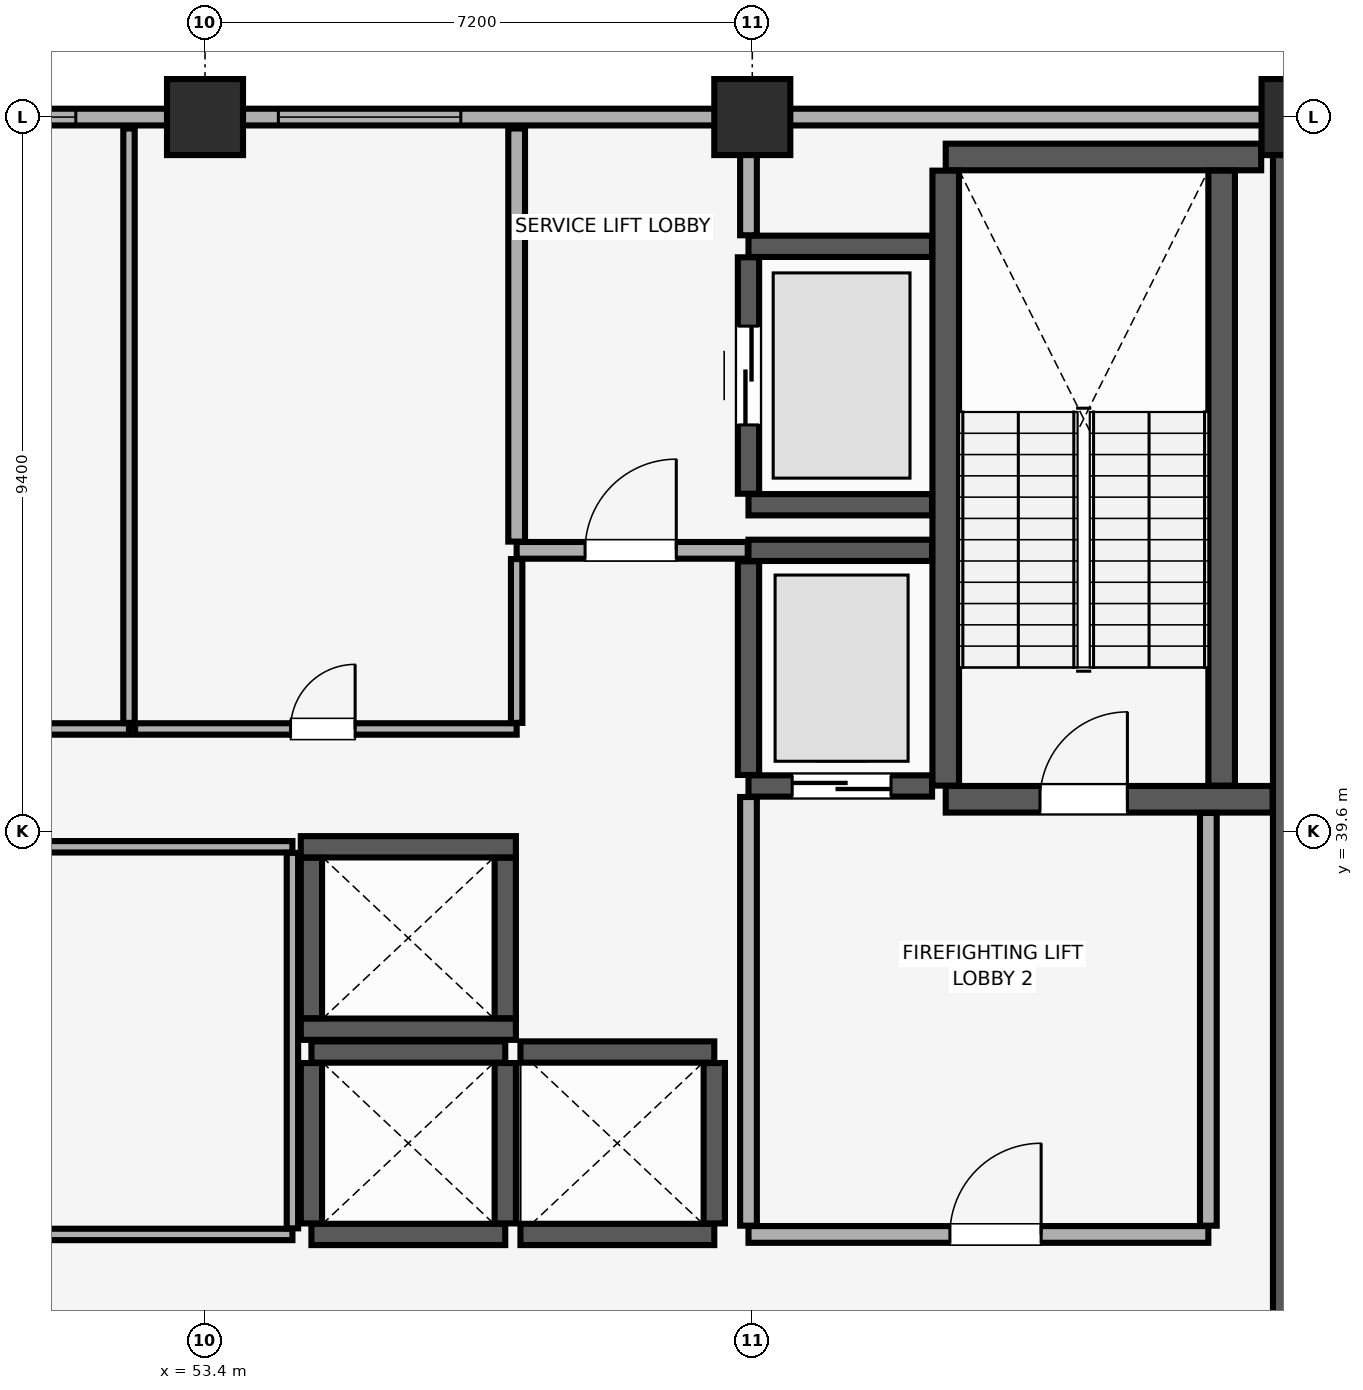
"""IFC4 building model, lengths in metres.
Left out: names, types, materials, properties, quantities, classifications, styles, units other than length and angle.
Written with IfcOpenShell. Run it as: python <this file> out.ifc"""

import sys

from ifc_helpers import new_model, si_unit, direction, frame, frame_2d, origin, origin_2d, place, context, subcontext, project, spatial, rectangle, extrude, element, fill, save


model = new_model("IFC4")
c1 = context("Model", 3, precision=1e-05, world=origin(), true_north=direction((0.0, 1.0)))
c2 = subcontext(c1, "Body", "Model", "MODEL_VIEW")
j1 = project(units=[si_unit("LENGTHUNIT", "METRE"), si_unit("PLANEANGLEUNIT", "RADIAN")], contexts=[c1])
p1 = place(None, origin())
s1 = spatial("IfcSite", under=j1, at=p1, CompositionType="ELEMENT")
p2 = place(p1, origin())
s2 = spatial("IfcBuilding", under=s1, at=p2, CompositionType="ELEMENT")
p3 = place(p2, frame((0.0, 0.0, 285.9)))
s3 = spatial("IfcBuildingStorey", under=s2, at=p3, CompositionType="ELEMENT", Elevation=285.9)
for number, where, z_axis, x_axis in (
    (1, (53.4, 49.0, 0.0), (0.0, 0.0, 1.0), (1.0, 0.0, 0.0)),
    (2, (60.6, 49.0, 0.0), (0.0, 0.0, 1.0), (1.0, 0.0, 0.0)),
    (3, (67.8, 49.0, 0.0), (0.0, 0.0, 1.0), (1.0, 0.0, 0.0)),
):
    element("IfcColumn", number, at=place(p3, frame(where, z_axis=z_axis, x_axis=x_axis)), inside=s3, PredefinedType="COLUMN", context=c2, shape_type="SweptSolid", body=[
        extrude(rectangle(XDim=1.0, YDim=1.0, at=origin_2d()), origin(), (0.0, 0.0, 1.0), 4.1),
    ])
p4 = place(p3, frame((71.4, 49.0, 0.0), z_axis=(0.0, 0.0, 1.0), x_axis=(-1.0, 0.0, 0.0)))
e4 = element("IfcWall", 4, at=p4, inside=s3, PredefinedType="SOLIDWALL", context=c2, shape_type="SweptSolid", body=[
    extrude(rectangle(XDim=58.8, YDim=0.22, at=frame_2d((29.4, 0.0))), origin(), (0.0, 0.0, 1.0), 3.3),
])
p5 = place(p4, frame((56.365, 0.0, 0.85)))
e5 = element("IfcOpeningElement", 5, at=p5, cuts=e4, PredefinedType="OPENING", context=c2, shape_type="SweptSolid", body=[
    extrude(rectangle(XDim=1.5, YDim=1.4, at=frame_2d((0.75, 0.7))), frame((0.0, 0.12, 0.0), z_axis=(0.0, -1.0, 0.0), x_axis=(1.0, 0.0, 0.0)), (0.0, 0.0, 1.0), 0.24),
])
p6 = place(p4, frame((0.935, 0.0, 0.85)))
e6 = element("IfcOpeningElement", 6, at=p6, cuts=e4, PredefinedType="OPENING", context=c2, shape_type="SweptSolid", body=[
    extrude(rectangle(XDim=1.5, YDim=1.4, at=frame_2d((0.75, 0.7))), frame((0.0, 0.12, 0.0), z_axis=(0.0, -1.0, 0.0), x_axis=(1.0, 0.0, 0.0)), (0.0, 0.0, 1.0), 0.24),
])
p7 = place(p4, frame((41.915, 0.0, 0.9)))
e7 = element("IfcOpeningElement", 7, at=p7, cuts=e4, PredefinedType="OPENING", context=c2, shape_type="SweptSolid", body=[
    extrude(rectangle(XDim=3.6, YDim=1.5, at=frame_2d((1.8, 0.75))), frame((0.0, 0.12, 0.0), z_axis=(0.0, -1.0, 0.0), x_axis=(1.0, 0.0, 0.0)), (0.0, 0.0, 1.0), 0.24),
])
p8 = place(p4, frame((36.85, 0.0, 0.9)))
e8 = element("IfcOpeningElement", 8, at=p8, cuts=e4, PredefinedType="OPENING", context=c2, shape_type="SweptSolid", body=[
    extrude(rectangle(XDim=3.0, YDim=1.5, at=frame_2d((1.5, 0.75))), frame((0.0, 0.12, 0.0), z_axis=(0.0, -1.0, 0.0), x_axis=(1.0, 0.0, 0.0)), (0.0, 0.0, 1.0), 0.24),
])
p9 = place(p4, frame((19.7, 0.0, 0.9)))
e9 = element("IfcOpeningElement", 9, at=p9, cuts=e4, PredefinedType="OPENING", context=c2, shape_type="SweptSolid", body=[
    extrude(rectangle(XDim=3.6, YDim=1.5, at=frame_2d((1.8, 0.75))), frame((0.0, 0.12, 0.0), z_axis=(0.0, -1.0, 0.0), x_axis=(1.0, 0.0, 0.0)), (0.0, 0.0, 1.0), 0.24),
])
p10 = place(p4, frame((14.635, 0.0, 0.9)))
e10 = element("IfcOpeningElement", 10, at=p10, cuts=e4, PredefinedType="OPENING", context=c2, shape_type="SweptSolid", body=[
    extrude(rectangle(XDim=2.4, YDim=1.5, at=frame_2d((1.2, 0.75))), frame((0.0, 0.12, 0.0), z_axis=(0.0, -1.0, 0.0), x_axis=(1.0, 0.0, 0.0)), (0.0, 0.0, 1.0), 0.24),
])
p11 = place(p3, frame((67.8, 29.4, 0.0), z_axis=(0.0, 0.0, 1.0), x_axis=(0.0, 1.0, 0.0)))
e11 = element("IfcWall", 11, at=p11, inside=s3, PredefinedType="SHEAR", context=c2, shape_type="SweptSolid", body=[
    extrude(rectangle(XDim=19.2, YDim=0.7, at=frame_2d((9.6, 0.0))), origin(), (0.0, 0.0, 1.0), 4.1),
])
p12 = place(p3, frame((63.145, 40.025, 0.0), z_axis=(0.0, 0.0, 1.0), x_axis=(1.0, 0.0, 0.0)))
e12 = element("IfcWall", 12, at=p12, inside=s3, PredefinedType="SHEAR", context=c2, shape_type="SweptSolid", body=[
    extrude(rectangle(XDim=4.3, YDim=0.35, at=frame_2d((2.15, 0.0))), origin(), (0.0, 0.0, 1.0), 4.1),
])
p13 = place(p12, frame((1.24, 0.0, 0.0)))
e13 = element("IfcOpeningElement", 13, at=p13, cuts=e12, PredefinedType="OPENING", context=c2, shape_type="SweptSolid", body=[
    extrude(rectangle(XDim=1.15, YDim=2.15, at=frame_2d((0.575, 1.075))), frame((0.0, 0.185, 0.0), z_axis=(0.0, -1.0, 0.0), x_axis=(1.0, 0.0, 0.0)), (0.0, 0.0, 1.0), 0.37),
])
p14 = place(p3, frame((63.145, 48.475, 0.0), z_axis=(0.0, 0.0, 1.0), x_axis=(1.0, 0.0, 0.0)))
e14 = element("IfcWall", 14, at=p14, inside=s3, PredefinedType="SHEAR", context=c2, shape_type="SweptSolid", body=[
    extrude(rectangle(XDim=4.15, YDim=0.35, at=frame_2d((2.075, 0.0))), origin(), (0.0, 0.0, 1.0), 4.1),
])
for number, where, z_axis, x_axis in (
    (15, (63.145, 40.205, 0.0), (0.0, 0.0, 1.0), (0.0, 1.0, 0.0)),
    (16, (66.775, 40.205, 0.0), (0.0, 0.0, 1.0), (0.0, 1.0, 0.0)),
):
    element("IfcWall", number, at=place(p3, frame(where, z_axis=z_axis, x_axis=x_axis)), inside=s3, PredefinedType="SHEAR", context=c2, shape_type="SweptSolid", body=[
        extrude(rectangle(XDim=8.09, YDim=0.35, at=frame_2d((4.045, 0.0))), origin(), (0.0, 0.0, 1.0), 4.1),
    ])
for number, where, z_axis, x_axis in (
    (17, (54.8, 34.3, 0.0), (0.0, 0.0, 1.0), (1.0, 0.0, 0.0)),
    (18, (54.8, 36.7, 0.0), (0.0, 0.0, 1.0), (1.0, 0.0, 0.0)),
):
    element("IfcWall", number, at=place(p3, frame(where, z_axis=z_axis, x_axis=x_axis)), inside=s3, PredefinedType="SHEAR", context=c2, shape_type="SweptSolid", body=[
        extrude(rectangle(XDim=2.55, YDim=0.28, at=frame_2d((1.275, 0.0))), origin(), (0.0, 0.0, 1.0), 4.1),
    ])
for number, where, z_axis, x_axis in (
    (19, (54.8, 34.445, 0.0), (0.0, 0.0, 1.0), (0.0, 1.0, 0.0)),
    (20, (57.35, 34.445, 0.0), (0.0, 0.0, 1.0), (0.0, 1.0, 0.0)),
):
    element("IfcWall", number, at=place(p3, frame(where, z_axis=z_axis, x_axis=x_axis)), inside=s3, PredefinedType="SHEAR", context=c2, shape_type="SweptSolid", body=[
        extrude(rectangle(XDim=2.11, YDim=0.28, at=frame_2d((1.055, 0.0))), origin(), (0.0, 0.0, 1.0), 4.1),
    ])
for number, where, z_axis, x_axis in (
    (21, (57.55, 34.3, 0.0), (0.0, 0.0, 1.0), (1.0, 0.0, 0.0)),
    (22, (57.55, 36.7, 0.0), (0.0, 0.0, 1.0), (1.0, 0.0, 0.0)),
):
    element("IfcWall", number, at=place(p3, frame(where, z_axis=z_axis, x_axis=x_axis)), inside=s3, PredefinedType="SHEAR", context=c2, shape_type="SweptSolid", body=[
        extrude(rectangle(XDim=2.55, YDim=0.28, at=frame_2d((1.275, 0.0))), origin(), (0.0, 0.0, 1.0), 4.1),
    ])
p15 = place(p3, frame((60.1, 34.445, 0.0), z_axis=(0.0, 0.0, 1.0), x_axis=(0.0, 1.0, 0.0)))
e23 = element("IfcWall", 23, at=p15, inside=s3, PredefinedType="SHEAR", context=c2, shape_type="SweptSolid", body=[
    extrude(rectangle(XDim=2.11, YDim=0.28, at=frame_2d((1.055, 0.0))), origin(), (0.0, 0.0, 1.0), 4.1),
])
for number, where, z_axis, x_axis in (
    (24, (54.66, 37.0, 0.0), (0.0, 0.0, 1.0), (1.0, 0.0, 0.0)),
    (25, (54.66, 39.4, 0.0), (0.0, 0.0, 1.0), (1.0, 0.0, 0.0)),
):
    element("IfcWall", number, at=place(p3, frame(where, z_axis=z_axis, x_axis=x_axis)), inside=s3, PredefinedType="SHEAR", context=c2, shape_type="SweptSolid", body=[
        extrude(rectangle(XDim=2.83, YDim=0.28, at=frame_2d((1.415, 0.0))), origin(), (0.0, 0.0, 1.0), 4.1),
    ])
for number, where, z_axis, x_axis in (
    (26, (54.8, 37.145, 0.0), (0.0, 0.0, 1.0), (0.0, 1.0, 0.0)),
    (27, (57.35, 37.145, 0.0), (0.0, 0.0, 1.0), (0.0, 1.0, 0.0)),
):
    element("IfcWall", number, at=place(p3, frame(where, z_axis=z_axis, x_axis=x_axis)), inside=s3, PredefinedType="SHEAR", context=c2, shape_type="SweptSolid", body=[
        extrude(rectangle(XDim=2.11, YDim=0.28, at=frame_2d((1.055, 0.0))), origin(), (0.0, 0.0, 1.0), 4.1),
    ])
p16 = place(p3, frame((60.55, 40.2, 0.0), z_axis=(0.0, 0.0, 1.0), x_axis=(1.0, 0.0, 0.0)))
e28 = element("IfcWall", 28, at=p16, inside=s3, PredefinedType="SHEAR", context=c2, shape_type="SweptSolid", body=[
    extrude(rectangle(XDim=2.415, YDim=0.28, at=frame_2d((1.208, 0.0))), origin(), (0.0, 0.0, 1.0), 4.1),
])
p17 = place(p16, frame((0.575, 0.0, 0.0)))
e29 = element("IfcOpeningElement", 29, at=p17, cuts=e28, PredefinedType="OPENING", context=c2, shape_type="SweptSolid", body=[
    extrude(rectangle(XDim=1.3, YDim=2.3, at=frame_2d((0.65, 1.15))), frame((0.0, 0.15, 0.0), z_axis=(0.0, -1.0, 0.0), x_axis=(1.0, 0.0, 0.0)), (0.0, 0.0, 1.0), 0.3),
])
p18 = place(p3, frame((60.55, 43.3, 0.0), z_axis=(0.0, 0.0, 1.0), x_axis=(1.0, 0.0, 0.0)))
e30 = element("IfcWall", 30, at=p18, inside=s3, PredefinedType="SHEAR", context=c2, shape_type="SweptSolid", body=[
    extrude(rectangle(XDim=2.415, YDim=0.28, at=frame_2d((1.208, 0.0))), origin(), (0.0, 0.0, 1.0), 4.1),
])
p19 = place(p3, frame((60.55, 40.345, 0.0), z_axis=(0.0, 0.0, 1.0), x_axis=(0.0, 1.0, 0.0)))
e31 = element("IfcWall", 31, at=p19, inside=s3, PredefinedType="SHEAR", context=c2, shape_type="SweptSolid", body=[
    extrude(rectangle(XDim=2.81, YDim=0.28, at=frame_2d((1.405, 0.0))), origin(), (0.0, 0.0, 1.0), 4.1),
])
for number, where, z_axis, x_axis in (
    (32, (60.55, 43.9, 0.0), (0.0, 0.0, 1.0), (1.0, 0.0, 0.0)),
    (33, (60.55, 47.3, 0.0), (0.0, 0.0, 1.0), (1.0, 0.0, 0.0)),
):
    element("IfcWall", number, at=place(p3, frame(where, z_axis=z_axis, x_axis=x_axis)), inside=s3, PredefinedType="SHEAR", context=c2, shape_type="SweptSolid", body=[
        extrude(rectangle(XDim=2.415, YDim=0.28, at=frame_2d((1.208, 0.0))), origin(), (0.0, 0.0, 1.0), 4.1),
    ])
p20 = place(p3, frame((60.55, 44.045, 0.0), z_axis=(0.0, 0.0, 1.0), x_axis=(0.0, 1.0, 0.0)))
e34 = element("IfcWall", 34, at=p20, inside=s3, PredefinedType="SHEAR", context=c2, shape_type="SweptSolid", body=[
    extrude(rectangle(XDim=3.11, YDim=0.28, at=frame_2d((1.555, 0.0))), origin(), (0.0, 0.0, 1.0), 4.1),
])
p21 = place(p20, frame((0.905, 0.0, 0.0)))
e35 = element("IfcOpeningElement", 35, at=p21, cuts=e34, PredefinedType="OPENING", context=c2, shape_type="SweptSolid", body=[
    extrude(rectangle(XDim=1.3, YDim=2.3, at=frame_2d((0.65, 1.15))), frame((0.0, 0.15, 0.0), z_axis=(0.0, -1.0, 0.0), x_axis=(1.0, 0.0, 0.0)), (0.0, 0.0, 1.0), 0.3),
])
p22 = place(p3, frame((60.55, 34.3, 0.0), z_axis=(0.0, 0.0, 1.0), x_axis=(1.0, 0.0, 0.0)))
e36 = element("IfcWall", 36, at=p22, inside=s3, PredefinedType="PARTITIONING", context=c2, shape_type="SweptSolid", body=[
    extrude(rectangle(XDim=6.05, YDim=0.22, at=frame_2d((3.025, 0.0))), origin(), (0.0, 0.0, 1.0), 4.1),
])
p23 = place(p22, frame((2.65, 0.0, 0.0)))
e37 = element("IfcOpeningElement", 37, at=p23, cuts=e36, PredefinedType="OPENING", context=c2, shape_type="SweptSolid", body=[
    extrude(rectangle(XDim=1.2, YDim=2.15, at=frame_2d((0.6, 1.075))), frame((0.0, 0.12, 0.0), z_axis=(0.0, -1.0, 0.0), x_axis=(1.0, 0.0, 0.0)), (0.0, 0.0, 1.0), 0.24),
])
p24 = place(p3, frame((60.55, 34.415, 0.0), z_axis=(0.0, 0.0, 1.0), x_axis=(0.0, 1.0, 0.0)))
e38 = element("IfcWall", 38, at=p24, inside=s3, PredefinedType="PARTITIONING", context=c2, shape_type="SweptSolid", body=[
    extrude(rectangle(XDim=5.64, YDim=0.22, at=frame_2d((2.82, 0.0))), origin(), (0.0, 0.0, 1.0), 4.1),
])
p25 = place(p3, frame((66.6, 34.415, 0.0), z_axis=(0.0, 0.0, 1.0), x_axis=(0.0, 1.0, 0.0)))
e39 = element("IfcWall", 39, at=p25, inside=s3, PredefinedType="PARTITIONING", context=c2, shape_type="SweptSolid", body=[
    extrude(rectangle(XDim=5.43, YDim=0.22, at=frame_2d((2.715, 0.0))), origin(), (0.0, 0.0, 1.0), 4.1),
])
p26 = place(p3, frame((57.5, 43.3, 0.0), z_axis=(0.0, 0.0, 1.0), x_axis=(1.0, 0.0, 0.0)))
e40 = element("IfcWall", 40, at=p26, inside=s3, PredefinedType="PARTITIONING", context=c2, shape_type="SweptSolid", body=[
    extrude(rectangle(XDim=3.04, YDim=0.22, at=frame_2d((1.52, 0.0))), origin(), (0.0, 0.0, 1.0), 4.1),
])
p27 = place(p26, frame((0.9, 0.0, 0.0)))
e41 = element("IfcOpeningElement", 41, at=p27, cuts=e40, PredefinedType="OPENING", context=c2, shape_type="SweptSolid", body=[
    extrude(rectangle(XDim=1.2, YDim=2.15, at=frame_2d((0.6, 1.075))), frame((0.0, 0.12, 0.0), z_axis=(0.0, -1.0, 0.0), x_axis=(1.0, 0.0, 0.0)), (0.0, 0.0, 1.0), 0.24),
])
p28 = place(p3, frame((57.5, 43.415, 0.0), z_axis=(0.0, 0.0, 1.0), x_axis=(0.0, 1.0, 0.0)))
e42 = element("IfcWall", 42, at=p28, inside=s3, PredefinedType="PARTITIONING", context=c2, shape_type="SweptSolid", body=[
    extrude(rectangle(XDim=5.435, YDim=0.22, at=frame_2d((2.718, 0.0))), origin(), (0.0, 0.0, 1.0), 4.1),
])
p29 = place(p3, frame((60.55, 47.445, 0.0), z_axis=(0.0, 0.0, 1.0), x_axis=(0.0, 1.0, 0.0)))
e43 = element("IfcWall", 43, at=p29, inside=s3, PredefinedType="PARTITIONING", context=c2, shape_type="SweptSolid", body=[
    extrude(rectangle(XDim=1.405, YDim=0.22, at=frame_2d((0.703, 0.0))), origin(), (0.0, 0.0, 1.0), 4.1),
])
p30 = place(p3, frame((46.6, 34.3, 0.0), z_axis=(0.0, 0.0, 1.0), x_axis=(1.0, 0.0, 0.0)))
e44 = element("IfcWall", 44, at=p30, inside=s3, PredefinedType="PARTITIONING", context=c2, shape_type="SweptSolid", body=[
    extrude(rectangle(XDim=7.95, YDim=0.15, at=frame_2d((3.975, 0.0))), origin(), (0.0, 0.0, 1.0), 4.1),
])
p31 = place(p30, frame((3.4, 0.0, 0.0)))
e45 = element("IfcOpeningElement", 45, at=p31, cuts=e44, PredefinedType="OPENING", context=c2, shape_type="SweptSolid", body=[
    extrude(rectangle(XDim=1.0, YDim=2.15, at=frame_2d((0.5, 1.075))), frame((0.0, 0.085, 0.0), z_axis=(0.0, -1.0, 0.0), x_axis=(1.0, 0.0, 0.0)), (0.0, 0.0, 1.0), 0.17),
])
p32 = place(p3, frame((46.6, 39.4, 0.0), z_axis=(0.0, 0.0, 1.0), x_axis=(1.0, 0.0, 0.0)))
e46 = element("IfcWall", 46, at=p32, inside=s3, PredefinedType="PARTITIONING", context=c2, shape_type="SweptSolid", body=[
    extrude(rectangle(XDim=7.95, YDim=0.15, at=frame_2d((3.975, 0.0))), origin(), (0.0, 0.0, 1.0), 4.1),
])
p33 = place(p3, frame((54.55, 34.38, 0.0), z_axis=(0.0, 0.0, 1.0), x_axis=(0.0, 1.0, 0.0)))
e47 = element("IfcWall", 47, at=p33, inside=s3, PredefinedType="PARTITIONING", context=c2, shape_type="SweptSolid", body=[
    extrude(rectangle(XDim=4.94, YDim=0.15, at=frame_2d((2.47, 0.0))), origin(), (0.0, 0.0, 1.0), 4.1),
])
p34 = place(p3, frame((47.468, 40.95, 0.0), z_axis=(0.0, 0.0, 1.0), x_axis=(1.0, 0.0, 0.0)))
e48 = element("IfcWall", 48, at=p34, inside=s3, PredefinedType="PARTITIONING", context=c2, shape_type="SweptSolid", body=[
    extrude(rectangle(XDim=4.932, YDim=0.15, at=frame_2d((2.466, 0.0))), origin(), (0.0, 0.0, 1.0), 4.1),
])
p35 = place(p34, frame((2.008, 0.0, 0.0)))
e49 = element("IfcOpeningElement", 49, at=p35, cuts=e48, PredefinedType="OPENING", context=c2, shape_type="SweptSolid", body=[
    extrude(rectangle(XDim=0.85, YDim=2.1, at=frame_2d((0.425, 1.05))), frame((0.0, 0.085, 0.0), z_axis=(0.0, -1.0, 0.0), x_axis=(1.0, 0.0, 0.0)), (0.0, 0.0, 1.0), 0.17),
])
p36 = place(p3, frame((52.4, 41.03, 0.0), z_axis=(0.0, 0.0, 1.0), x_axis=(0.0, 1.0, 0.0)))
e50 = element("IfcWall", 50, at=p36, inside=s3, PredefinedType="PARTITIONING", context=c2, shape_type="SweptSolid", body=[
    extrude(rectangle(XDim=7.82, YDim=0.15, at=frame_2d((3.91, 0.0))), origin(), (0.0, 0.0, 1.0), 4.1),
])
p37 = place(p3, frame((52.48, 40.95, 0.0), z_axis=(0.0, 0.0, 1.0), x_axis=(1.0, 0.0, 0.0)))
e51 = element("IfcWall", 51, at=p37, inside=s3, PredefinedType="PARTITIONING", context=c2, shape_type="SweptSolid", body=[
    extrude(rectangle(XDim=5.02, YDim=0.15, at=frame_2d((2.51, 0.0))), origin(), (0.0, 0.0, 1.0), 4.1),
])
p38 = place(p37, frame((2.045, 0.0, 0.0)))
e52 = element("IfcOpeningElement", 52, at=p38, cuts=e51, PredefinedType="OPENING", context=c2, shape_type="SweptSolid", body=[
    extrude(rectangle(XDim=0.85, YDim=2.1, at=frame_2d((0.425, 1.05))), frame((0.0, 0.085, 0.0), z_axis=(0.0, -1.0, 0.0), x_axis=(1.0, 0.0, 0.0)), (0.0, 0.0, 1.0), 0.17),
])
p39 = place(p3, frame((57.5, 41.03, 0.0), z_axis=(0.0, 0.0, 1.0), x_axis=(0.0, 1.0, 0.0)))
e53 = element("IfcWall", 53, at=p39, inside=s3, PredefinedType="PARTITIONING", context=c2, shape_type="SweptSolid", body=[
    extrude(rectangle(XDim=2.155, YDim=0.15, at=frame_2d((1.078, 0.0))), origin(), (0.0, 0.0, 1.0), 4.1),
])
p40 = place(p9, origin())
e54 = element("IfcWindow", 54, at=p40, inside=s3, PartitioningType="SINGLE_PANEL", PredefinedType="WINDOW", context=c2, shape_type="SweptSolid", body=[
    extrude(rectangle(XDim=3.6, YDim=1.5, at=frame_2d((1.8, 0.75))), frame((0.0, 0.03, 0.0), z_axis=(0.0, -1.0, 0.0), x_axis=(1.0, 0.0, 0.0)), (0.0, 0.0, 1.0), 0.06),
])
fill(e9, e54)
p41 = place(p10, origin())
e55 = element("IfcWindow", 55, at=p41, inside=s3, PartitioningType="SINGLE_PANEL", PredefinedType="WINDOW", context=c2, shape_type="SweptSolid", body=[
    extrude(rectangle(XDim=2.4, YDim=1.5, at=frame_2d((1.2, 0.75))), frame((0.0, 0.03, 0.0), z_axis=(0.0, -1.0, 0.0), x_axis=(1.0, 0.0, 0.0)), (0.0, 0.0, 1.0), 0.06),
])
fill(e10, e55)
p42 = place(p13, origin())
e56 = element("IfcDoor", 56, at=p42, inside=s3, OperationType="SINGLE_SWING_RIGHT", PredefinedType="DOOR", context=c2, shape_type="SweptSolid", body=[
    extrude(rectangle(XDim=1.15, YDim=2.15, at=frame_2d((0.575, 1.075))), frame((0.0, 0.025, 0.0), z_axis=(0.0, -1.0, 0.0), x_axis=(1.0, 0.0, 0.0)), (0.0, 0.0, 1.0), 0.05),
])
fill(e13, e56)
p43 = place(p17, origin())
e57 = element("IfcDoor", 57, at=p43, inside=s3, OperationType="DOUBLE_DOOR_SLIDING", PredefinedType="DOOR", context=c2, shape_type="SweptSolid", body=[
    extrude(rectangle(XDim=1.3, YDim=2.3, at=frame_2d((0.65, 1.15))), frame((0.0, 0.025, 0.0), z_axis=(0.0, -1.0, 0.0), x_axis=(1.0, 0.0, 0.0)), (0.0, 0.0, 1.0), 0.05),
])
fill(e29, e57)
p44 = place(p21, origin())
e58 = element("IfcDoor", 58, at=p44, inside=s3, OperationType="DOUBLE_DOOR_SLIDING", PredefinedType="DOOR", context=c2, shape_type="SweptSolid", body=[
    extrude(rectangle(XDim=1.3, YDim=2.3, at=frame_2d((0.65, 1.15))), frame((0.0, 0.025, 0.0), z_axis=(0.0, -1.0, 0.0), x_axis=(1.0, 0.0, 0.0)), (0.0, 0.0, 1.0), 0.05),
])
fill(e35, e58)
p45 = place(p23, origin())
e59 = element("IfcDoor", 59, at=p45, inside=s3, OperationType="SINGLE_SWING_RIGHT", PredefinedType="DOOR", context=c2, shape_type="SweptSolid", body=[
    extrude(rectangle(XDim=1.2, YDim=2.15, at=frame_2d((0.6, 1.075))), frame((0.0, 0.025, 0.0), z_axis=(0.0, -1.0, 0.0), x_axis=(1.0, 0.0, 0.0)), (0.0, 0.0, 1.0), 0.05),
])
fill(e37, e59)
p46 = place(p27, origin())
e60 = element("IfcDoor", 60, at=p46, inside=s3, OperationType="SINGLE_SWING_RIGHT", PredefinedType="DOOR", context=c2, shape_type="SweptSolid", body=[
    extrude(rectangle(XDim=1.2, YDim=2.15, at=frame_2d((0.6, 1.075))), frame((0.0, 0.025, 0.0), z_axis=(0.0, -1.0, 0.0), x_axis=(1.0, 0.0, 0.0)), (0.0, 0.0, 1.0), 0.05),
])
fill(e41, e60)
p47 = place(p38, origin())
e61 = element("IfcDoor", 61, at=p47, inside=s3, OperationType="SINGLE_SWING_RIGHT", PredefinedType="DOOR", context=c2, shape_type="SweptSolid", body=[
    extrude(rectangle(XDim=0.85, YDim=2.1, at=frame_2d((0.425, 1.05))), frame((0.0, 0.025, 0.0), z_axis=(0.0, -1.0, 0.0), x_axis=(1.0, 0.0, 0.0)), (0.0, 0.0, 1.0), 0.05),
])
fill(e52, e61)
save(model, sys.argv[1])
